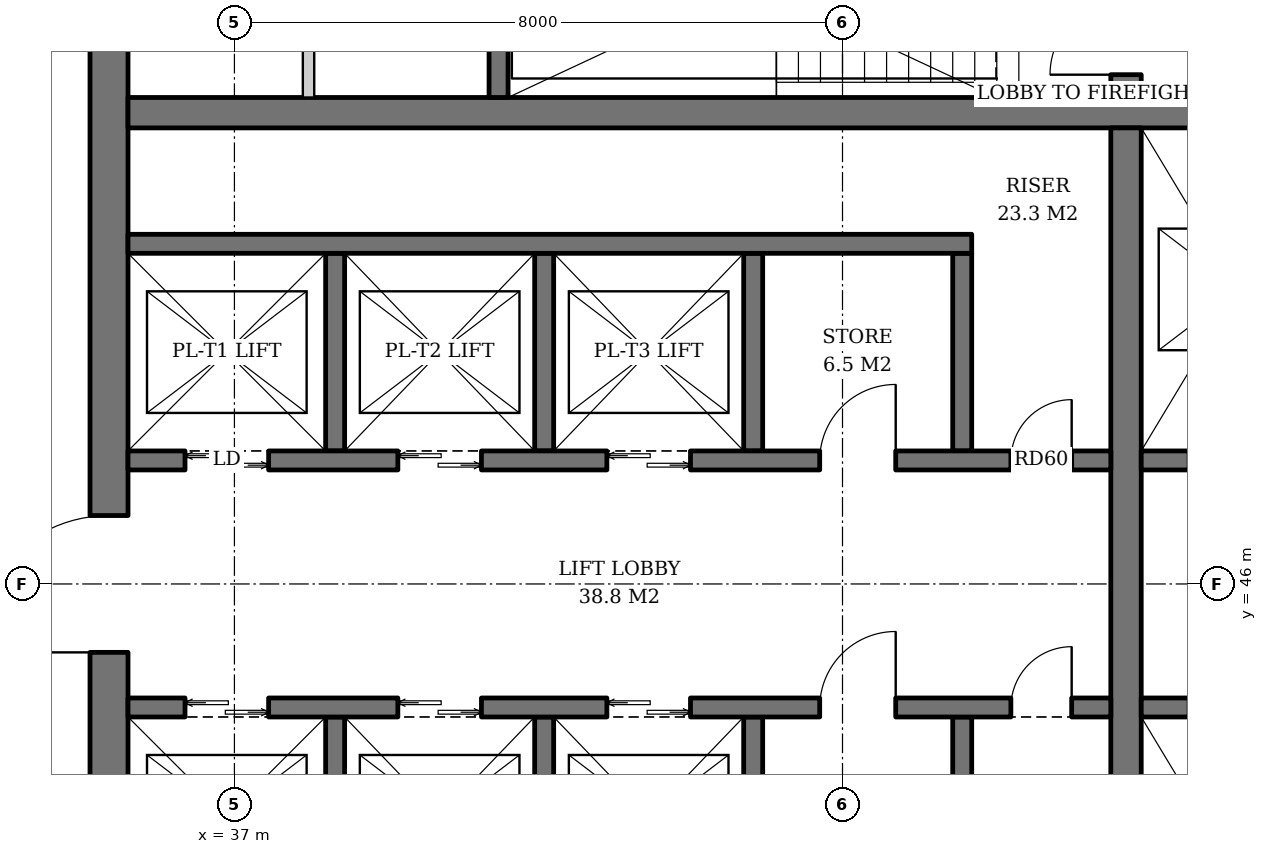
"""IFC4 building model, lengths in metres.
Left out: names, types, materials, properties, quantities, classifications, styles, units other than length and angle.
Written with IfcOpenShell. Run it as: python <this file> out.ifc"""

import sys

from ifc_helpers import new_model, si_unit, direction, frame, frame_2d, origin, place, context, subcontext, project, spatial, rectangle, extrude, element, fill, save


model = new_model("IFC4")
c1 = context("Model", 3, precision=1e-05, world=origin(), true_north=direction((0.0, 1.0)))
c2 = subcontext(c1, "Body", "Model", "MODEL_VIEW")
j1 = project(units=[si_unit("LENGTHUNIT", "METRE"), si_unit("PLANEANGLEUNIT", "RADIAN")], contexts=[c1])
p1 = place(None, origin())
s1 = spatial("IfcSite", under=j1, at=p1, CompositionType="ELEMENT")
p2 = place(p1, origin())
s2 = spatial("IfcBuilding", under=s1, at=p2, CompositionType="ELEMENT")
p3 = place(p2, frame((0.0, 0.0, 237.6)))
s3 = spatial("IfcBuildingStorey", under=s2, at=p3, CompositionType="ELEMENT", Elevation=237.6)
p4 = place(p3, frame((35.35, 36.6, 0.0), z_axis=(0.0, 0.0, 1.0), x_axis=(0.0, 1.0, 0.0)))
e1 = element("IfcWall", 1, at=p4, inside=s3, PredefinedType="SHEAR", context=c2, shape_type="SweptSolid", body=[
    extrude(rectangle(XDim=18.8, YDim=0.5, at=frame_2d((9.4, 0.0))), origin(), (0.0, 0.0, 1.0), 3.8),
])
p5 = place(p4, frame((8.5, 0.0, 0.0)))
e2 = element("IfcOpeningElement", 2, at=p5, cuts=e1, PredefinedType="OPENING", context=c2, shape_type="SweptSolid", body=[
    extrude(rectangle(XDim=1.8, YDim=2.4, at=frame_2d((0.9, 1.2))), frame((0.0, 0.26, 0.0), z_axis=(0.0, -1.0, 0.0), x_axis=(1.0, 0.0, 0.0)), (0.0, 0.0, 1.0), 0.52),
])
p6 = place(p3, frame((35.6, 52.2, 0.0), z_axis=(0.0, 0.0, 1.0), x_axis=(1.0, 0.0, 0.0)))
e3 = element("IfcWall", 3, at=p6, inside=s3, PredefinedType="SHEAR", context=c2, shape_type="SweptSolid", body=[
    extrude(rectangle(XDim=18.8, YDim=0.4, at=frame_2d((9.4, 0.0))), origin(), (0.0, 0.0, 1.0), 3.8),
])
p7 = place(p3, frame((48.73, 40.0, 0.0), z_axis=(0.0, 0.0, 1.0), x_axis=(0.0, 1.0, 0.0)))
e4 = element("IfcWall", 4, at=p7, inside=s3, PredefinedType="SHEAR", context=c2, shape_type="SweptSolid", body=[
    extrude(rectangle(XDim=12.0, YDim=0.4, at=frame_2d((6.0, 0.0))), origin(), (0.0, 0.0, 1.0), 3.8),
])
p8 = place(p3, frame((48.73, 52.4, 0.0), z_axis=(0.0, 0.0, 1.0), x_axis=(0.0, 1.0, 0.0)))
e5 = element("IfcWall", 5, at=p8, inside=s3, PredefinedType="SHEAR", context=c2, shape_type="SweptSolid", body=[
    extrude(rectangle(XDim=3.0, YDim=0.4, at=frame_2d((1.5, 0.0))), origin(), (0.0, 0.0, 1.0), 3.8),
])
p9 = place(p8, frame((0.3, 0.0, 0.0)))
e6 = element("IfcOpeningElement", 6, at=p9, cuts=e5, PredefinedType="OPENING", context=c2, shape_type="SweptSolid", body=[
    extrude(rectangle(XDim=1.0, YDim=2.1, at=frame_2d((0.5, 1.05))), frame((0.0, 0.21, 0.0), z_axis=(0.0, -1.0, 0.0), x_axis=(1.0, 0.0, 0.0)), (0.0, 0.0, 1.0), 0.42),
])
p10 = place(p3, frame((40.475, 52.4, 0.0), z_axis=(0.0, 0.0, 1.0), x_axis=(0.0, 1.0, 0.0)))
e7 = element("IfcWall", 7, at=p10, inside=s3, PredefinedType="SHEAR", context=c2, shape_type="SweptSolid", body=[
    extrude(rectangle(XDim=3.0, YDim=0.25, at=frame_2d((1.5, 0.0))), origin(), (0.0, 0.0, 1.0), 3.8),
])
for number, where, z_axis, x_axis in (
    (8, (38.325, 47.75, 0.0), (0.0, 0.0, 1.0), (0.0, 1.0, 0.0)),
    (9, (41.075, 47.75, 0.0), (0.0, 0.0, 1.0), (0.0, 1.0, 0.0)),
    (10, (43.825, 47.75, 0.0), (0.0, 0.0, 1.0), (0.0, 1.0, 0.0)),
    (11, (46.575, 47.75, 0.0), (0.0, 0.0, 1.0), (0.0, 1.0, 0.0)),
):
    element("IfcWall", number, at=place(p3, frame(where, z_axis=z_axis, x_axis=x_axis)), inside=s3, PredefinedType="SHEAR", context=c2, shape_type="SweptSolid", body=[
        extrude(rectangle(XDim=2.6, YDim=0.25, at=frame_2d((1.3, 0.0))), origin(), (0.0, 0.0, 1.0), 3.8),
    ])
p11 = place(p3, frame((35.6, 50.475, 0.0), z_axis=(0.0, 0.0, 1.0), x_axis=(1.0, 0.0, 0.0)))
e12 = element("IfcWall", 12, at=p11, inside=s3, PredefinedType="SHEAR", context=c2, shape_type="SweptSolid", body=[
    extrude(rectangle(XDim=11.1, YDim=0.25, at=frame_2d((5.55, 0.0))), origin(), (0.0, 0.0, 1.0), 3.8),
])
p12 = place(p3, frame((35.6, 47.625, 0.0), z_axis=(0.0, 0.0, 1.0), x_axis=(1.0, 0.0, 0.0)))
e13 = element("IfcWall", 13, at=p12, inside=s3, PredefinedType="SHEAR", context=c2, shape_type="SweptSolid", body=[
    extrude(rectangle(XDim=12.93, YDim=0.25, at=frame_2d((6.465, 0.0))), origin(), (0.0, 0.0, 1.0), 3.8),
])
p13 = place(p12, frame((0.75, 0.0, 0.0)))
e14 = element("IfcOpeningElement", 14, at=p13, cuts=e13, PredefinedType="OPENING", context=c2, shape_type="SweptSolid", body=[
    extrude(rectangle(XDim=1.1, YDim=2.2, at=frame_2d((0.55, 1.1))), frame((0.0, 0.135, 0.0), z_axis=(0.0, -1.0, 0.0), x_axis=(1.0, 0.0, 0.0)), (0.0, 0.0, 1.0), 0.27),
])
p14 = place(p12, frame((3.55, 0.0, 0.0)))
e15 = element("IfcOpeningElement", 15, at=p14, cuts=e13, PredefinedType="OPENING", context=c2, shape_type="SweptSolid", body=[
    extrude(rectangle(XDim=1.1, YDim=2.2, at=frame_2d((0.55, 1.1))), frame((0.0, 0.135, 0.0), z_axis=(0.0, -1.0, 0.0), x_axis=(1.0, 0.0, 0.0)), (0.0, 0.0, 1.0), 0.27),
])
p15 = place(p12, frame((6.3, 0.0, 0.0)))
e16 = element("IfcOpeningElement", 16, at=p15, cuts=e13, PredefinedType="OPENING", context=c2, shape_type="SweptSolid", body=[
    extrude(rectangle(XDim=1.1, YDim=2.2, at=frame_2d((0.55, 1.1))), frame((0.0, 0.135, 0.0), z_axis=(0.0, -1.0, 0.0), x_axis=(1.0, 0.0, 0.0)), (0.0, 0.0, 1.0), 0.27),
])
p16 = place(p12, frame((9.1, 0.0, 0.0)))
e17 = element("IfcOpeningElement", 17, at=p16, cuts=e13, PredefinedType="OPENING", context=c2, shape_type="SweptSolid", body=[
    extrude(rectangle(XDim=1.0, YDim=2.1, at=frame_2d((0.5, 1.05))), frame((0.0, 0.135, 0.0), z_axis=(0.0, -1.0, 0.0), x_axis=(1.0, 0.0, 0.0)), (0.0, 0.0, 1.0), 0.27),
])
p17 = place(p12, frame((11.615, 0.0, 0.0)))
e18 = element("IfcOpeningElement", 18, at=p17, cuts=e13, PredefinedType="OPENING", context=c2, shape_type="SweptSolid", body=[
    extrude(rectangle(XDim=0.8, YDim=2.0, at=frame_2d((0.4, 1.0))), frame((0.0, 0.135, 0.0), z_axis=(0.0, -1.0, 0.0), x_axis=(1.0, 0.0, 0.0)), (0.0, 0.0, 1.0), 0.27),
])
for number, where, z_axis, x_axis in (
    (19, (38.325, 44.25, 0.0), (0.0, 0.0, 1.0), (0.0, -1.0, 0.0)),
    (20, (41.075, 44.25, 0.0), (0.0, 0.0, 1.0), (0.0, -1.0, 0.0)),
    (21, (43.825, 44.25, 0.0), (0.0, 0.0, 1.0), (0.0, -1.0, 0.0)),
    (22, (46.575, 44.25, 0.0), (0.0, 0.0, 1.0), (0.0, -1.0, 0.0)),
):
    element("IfcWall", number, at=place(p3, frame(where, z_axis=z_axis, x_axis=x_axis)), inside=s3, PredefinedType="SHEAR", context=c2, shape_type="SweptSolid", body=[
        extrude(rectangle(XDim=2.6, YDim=0.25, at=frame_2d((1.3, 0.0))), origin(), (0.0, 0.0, 1.0), 3.8),
    ])
p18 = place(p3, frame((35.6, 44.375, 0.0), z_axis=(0.0, 0.0, 1.0), x_axis=(1.0, 0.0, 0.0)))
e23 = element("IfcWall", 23, at=p18, inside=s3, PredefinedType="SHEAR", context=c2, shape_type="SweptSolid", body=[
    extrude(rectangle(XDim=12.93, YDim=0.25, at=frame_2d((6.465, 0.0))), origin(), (0.0, 0.0, 1.0), 3.8),
])
p19 = place(p18, frame((0.75, 0.0, 0.0)))
e24 = element("IfcOpeningElement", 24, at=p19, cuts=e23, PredefinedType="OPENING", context=c2, shape_type="SweptSolid", body=[
    extrude(rectangle(XDim=1.1, YDim=2.2, at=frame_2d((0.55, 1.1))), frame((0.0, 0.135, 0.0), z_axis=(0.0, -1.0, 0.0), x_axis=(1.0, 0.0, 0.0)), (0.0, 0.0, 1.0), 0.27),
])
p20 = place(p18, frame((3.55, 0.0, 0.0)))
e25 = element("IfcOpeningElement", 25, at=p20, cuts=e23, PredefinedType="OPENING", context=c2, shape_type="SweptSolid", body=[
    extrude(rectangle(XDim=1.1, YDim=2.2, at=frame_2d((0.55, 1.1))), frame((0.0, 0.135, 0.0), z_axis=(0.0, -1.0, 0.0), x_axis=(1.0, 0.0, 0.0)), (0.0, 0.0, 1.0), 0.27),
])
p21 = place(p18, frame((6.3, 0.0, 0.0)))
e26 = element("IfcOpeningElement", 26, at=p21, cuts=e23, PredefinedType="OPENING", context=c2, shape_type="SweptSolid", body=[
    extrude(rectangle(XDim=1.1, YDim=2.2, at=frame_2d((0.55, 1.1))), frame((0.0, 0.135, 0.0), z_axis=(0.0, -1.0, 0.0), x_axis=(1.0, 0.0, 0.0)), (0.0, 0.0, 1.0), 0.27),
])
p22 = place(p18, frame((9.1, 0.0, 0.0)))
e27 = element("IfcOpeningElement", 27, at=p22, cuts=e23, PredefinedType="OPENING", context=c2, shape_type="SweptSolid", body=[
    extrude(rectangle(XDim=1.0, YDim=2.1, at=frame_2d((0.5, 1.05))), frame((0.0, 0.135, 0.0), z_axis=(0.0, -1.0, 0.0), x_axis=(1.0, 0.0, 0.0)), (0.0, 0.0, 1.0), 0.27),
])
p23 = place(p18, frame((11.615, 0.0, 0.0)))
e28 = element("IfcOpeningElement", 28, at=p23, cuts=e23, PredefinedType="OPENING", context=c2, shape_type="SweptSolid", body=[
    extrude(rectangle(XDim=0.8, YDim=2.0, at=frame_2d((0.4, 1.0))), frame((0.0, 0.135, 0.0), z_axis=(0.0, -1.0, 0.0), x_axis=(1.0, 0.0, 0.0)), (0.0, 0.0, 1.0), 0.27),
])
p24 = place(p3, frame((48.93, 47.625, 0.0), z_axis=(0.0, 0.0, 1.0), x_axis=(1.0, 0.0, 0.0)))
e29 = element("IfcWall", 29, at=p24, inside=s3, PredefinedType="SHEAR", context=c2, shape_type="SweptSolid", body=[
    extrude(rectangle(XDim=5.47, YDim=0.25, at=frame_2d((2.735, 0.0))), origin(), (0.0, 0.0, 1.0), 3.8),
])
p25 = place(p24, frame((0.63, 0.0, 0.0)))
e30 = element("IfcOpeningElement", 30, at=p25, cuts=e29, PredefinedType="OPENING", context=c2, shape_type="SweptSolid", body=[
    extrude(rectangle(XDim=1.3, YDim=2.2, at=frame_2d((0.65, 1.1))), frame((0.0, 0.135, 0.0), z_axis=(0.0, -1.0, 0.0), x_axis=(1.0, 0.0, 0.0)), (0.0, 0.0, 1.0), 0.27),
])
p26 = place(p24, frame((3.49, 0.0, 0.0)))
e31 = element("IfcOpeningElement", 31, at=p26, cuts=e29, PredefinedType="OPENING", context=c2, shape_type="SweptSolid", body=[
    extrude(rectangle(XDim=1.3, YDim=2.2, at=frame_2d((0.65, 1.1))), frame((0.0, 0.135, 0.0), z_axis=(0.0, -1.0, 0.0), x_axis=(1.0, 0.0, 0.0)), (0.0, 0.0, 1.0), 0.27),
])
p27 = place(p3, frame((48.93, 44.375, 0.0), z_axis=(0.0, 0.0, 1.0), x_axis=(1.0, 0.0, 0.0)))
e32 = element("IfcWall", 32, at=p27, inside=s3, PredefinedType="SHEAR", context=c2, shape_type="SweptSolid", body=[
    extrude(rectangle(XDim=5.47, YDim=0.25, at=frame_2d((2.735, 0.0))), origin(), (0.0, 0.0, 1.0), 3.8),
])
p28 = place(p27, frame((0.63, 0.0, 0.0)))
e33 = element("IfcOpeningElement", 33, at=p28, cuts=e32, PredefinedType="OPENING", context=c2, shape_type="SweptSolid", body=[
    extrude(rectangle(XDim=1.3, YDim=2.2, at=frame_2d((0.65, 1.1))), frame((0.0, 0.135, 0.0), z_axis=(0.0, -1.0, 0.0), x_axis=(1.0, 0.0, 0.0)), (0.0, 0.0, 1.0), 0.27),
])
p29 = place(p27, frame((3.49, 0.0, 0.0)))
e34 = element("IfcOpeningElement", 34, at=p29, cuts=e32, PredefinedType="OPENING", context=c2, shape_type="SweptSolid", body=[
    extrude(rectangle(XDim=1.3, YDim=2.2, at=frame_2d((0.65, 1.1))), frame((0.0, 0.135, 0.0), z_axis=(0.0, -1.0, 0.0), x_axis=(1.0, 0.0, 0.0)), (0.0, 0.0, 1.0), 0.27),
])
p30 = place(p3, frame((37.975, 52.4, 0.0), z_axis=(0.0, 0.0, 1.0), x_axis=(0.0, 1.0, 0.0)))
e35 = element("IfcWall", 35, at=p30, inside=s3, PredefinedType="SOLIDWALL", context=c2, shape_type="SweptSolid", body=[
    extrude(rectangle(XDim=3.0, YDim=0.15, at=frame_2d((1.5, 0.0))), origin(), (0.0, 0.0, 1.0), 3.62),
])
p31 = place(p13, origin())
e36 = element("IfcDoor", 36, at=p31, inside=s3, OperationType="DOUBLE_DOOR_SLIDING", PredefinedType="DOOR", context=c2, shape_type="SweptSolid", body=[
    extrude(rectangle(XDim=1.1, YDim=2.2, at=frame_2d((0.55, 1.1))), frame((0.0, 0.025, 0.0), z_axis=(0.0, -1.0, 0.0), x_axis=(1.0, 0.0, 0.0)), (0.0, 0.0, 1.0), 0.05),
])
fill(e14, e36)
p32 = place(p14, origin())
e37 = element("IfcDoor", 37, at=p32, inside=s3, OperationType="DOUBLE_DOOR_SLIDING", PredefinedType="DOOR", context=c2, shape_type="SweptSolid", body=[
    extrude(rectangle(XDim=1.1, YDim=2.2, at=frame_2d((0.55, 1.1))), frame((0.0, 0.025, 0.0), z_axis=(0.0, -1.0, 0.0), x_axis=(1.0, 0.0, 0.0)), (0.0, 0.0, 1.0), 0.05),
])
fill(e15, e37)
p33 = place(p15, origin())
e38 = element("IfcDoor", 38, at=p33, inside=s3, OperationType="DOUBLE_DOOR_SLIDING", PredefinedType="DOOR", context=c2, shape_type="SweptSolid", body=[
    extrude(rectangle(XDim=1.1, YDim=2.2, at=frame_2d((0.55, 1.1))), frame((0.0, 0.025, 0.0), z_axis=(0.0, -1.0, 0.0), x_axis=(1.0, 0.0, 0.0)), (0.0, 0.0, 1.0), 0.05),
])
fill(e16, e38)
p34 = place(p16, origin())
e39 = element("IfcDoor", 39, at=p34, inside=s3, OperationType="SINGLE_SWING_RIGHT", PredefinedType="DOOR", context=c2, shape_type="SweptSolid", body=[
    extrude(rectangle(XDim=1.0, YDim=2.1, at=frame_2d((0.5, 1.05))), frame((0.0, 0.025, 0.0), z_axis=(0.0, -1.0, 0.0), x_axis=(1.0, 0.0, 0.0)), (0.0, 0.0, 1.0), 0.05),
])
fill(e17, e39)
p35 = place(p17, origin())
e40 = element("IfcDoor", 40, at=p35, inside=s3, OperationType="SINGLE_SWING_RIGHT", PredefinedType="DOOR", context=c2, shape_type="SweptSolid", body=[
    extrude(rectangle(XDim=0.8, YDim=2.0, at=frame_2d((0.4, 1.0))), frame((0.0, 0.025, 0.0), z_axis=(0.0, -1.0, 0.0), x_axis=(1.0, 0.0, 0.0)), (0.0, 0.0, 1.0), 0.05),
])
fill(e18, e40)
p36 = place(p19, origin())
e41 = element("IfcDoor", 41, at=p36, inside=s3, OperationType="DOUBLE_DOOR_SLIDING", PredefinedType="DOOR", context=c2, shape_type="SweptSolid", body=[
    extrude(rectangle(XDim=1.1, YDim=2.2, at=frame_2d((0.55, 1.1))), frame((0.0, 0.025, 0.0), z_axis=(0.0, -1.0, 0.0), x_axis=(1.0, 0.0, 0.0)), (0.0, 0.0, 1.0), 0.05),
])
fill(e24, e41)
p37 = place(p20, origin())
e42 = element("IfcDoor", 42, at=p37, inside=s3, OperationType="DOUBLE_DOOR_SLIDING", PredefinedType="DOOR", context=c2, shape_type="SweptSolid", body=[
    extrude(rectangle(XDim=1.1, YDim=2.2, at=frame_2d((0.55, 1.1))), frame((0.0, 0.025, 0.0), z_axis=(0.0, -1.0, 0.0), x_axis=(1.0, 0.0, 0.0)), (0.0, 0.0, 1.0), 0.05),
])
fill(e25, e42)
p38 = place(p21, origin())
e43 = element("IfcDoor", 43, at=p38, inside=s3, OperationType="DOUBLE_DOOR_SLIDING", PredefinedType="DOOR", context=c2, shape_type="SweptSolid", body=[
    extrude(rectangle(XDim=1.1, YDim=2.2, at=frame_2d((0.55, 1.1))), frame((0.0, 0.025, 0.0), z_axis=(0.0, -1.0, 0.0), x_axis=(1.0, 0.0, 0.0)), (0.0, 0.0, 1.0), 0.05),
])
fill(e26, e43)
p39 = place(p22, origin())
e44 = element("IfcDoor", 44, at=p39, inside=s3, OperationType="SINGLE_SWING_RIGHT", PredefinedType="DOOR", context=c2, shape_type="SweptSolid", body=[
    extrude(rectangle(XDim=1.0, YDim=2.1, at=frame_2d((0.5, 1.05))), frame((0.0, 0.025, 0.0), z_axis=(0.0, -1.0, 0.0), x_axis=(1.0, 0.0, 0.0)), (0.0, 0.0, 1.0), 0.05),
])
fill(e27, e44)
p40 = place(p23, origin())
e45 = element("IfcDoor", 45, at=p40, inside=s3, OperationType="SINGLE_SWING_RIGHT", PredefinedType="DOOR", context=c2, shape_type="SweptSolid", body=[
    extrude(rectangle(XDim=0.8, YDim=2.0, at=frame_2d((0.4, 1.0))), frame((0.0, 0.025, 0.0), z_axis=(0.0, -1.0, 0.0), x_axis=(1.0, 0.0, 0.0)), (0.0, 0.0, 1.0), 0.05),
])
fill(e28, e45)
p41 = place(p9, origin())
e46 = element("IfcDoor", 46, at=p41, inside=s3, OperationType="SINGLE_SWING_LEFT", PredefinedType="DOOR", context=c2, shape_type="SweptSolid", body=[
    extrude(rectangle(XDim=1.0, YDim=2.1, at=frame_2d((0.5, 1.05))), frame((0.0, 0.025, 0.0), z_axis=(0.0, -1.0, 0.0), x_axis=(1.0, 0.0, 0.0)), (0.0, 0.0, 1.0), 0.05),
])
fill(e6, e46)
p42 = place(p5, origin())
e47 = element("IfcDoor", 47, at=p42, inside=s3, OperationType="DOUBLE_DOOR_SINGLE_SWING", PredefinedType="DOOR", context=c2, shape_type="SweptSolid", body=[
    extrude(rectangle(XDim=1.8, YDim=2.4, at=frame_2d((0.9, 1.2))), frame((0.0, 0.025, 0.0), z_axis=(0.0, -1.0, 0.0), x_axis=(1.0, 0.0, 0.0)), (0.0, 0.0, 1.0), 0.05),
])
fill(e2, e47)
save(model, sys.argv[1])
